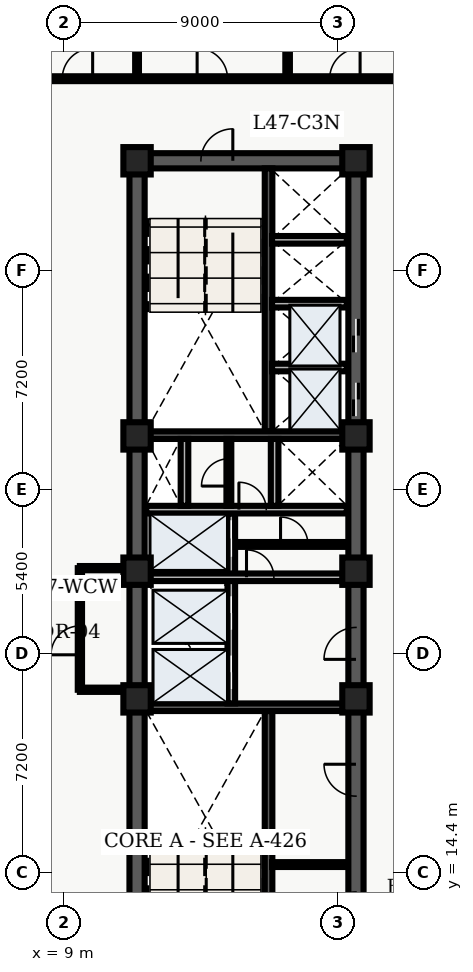
"""IFC4 building model, lengths in metres.
Left out: names, types, materials, properties, quantities, classifications, styles, units other than length and angle.
Written with IfcOpenShell. Run it as: python <this file> out.ifc"""

import sys

from ifc_helpers import new_model, entity, si_unit, converted_unit, direction, frame, origin_with_axes, origin_2d_with_axis, place, context, subcontext, project, spatial, polyline, rectangle, outline, extrude, element, fill, save


model = new_model("IFC4")
c1 = context("Model", 3, precision=1e-05, world=origin_with_axes(), true_north=direction((0.0, 1.0)))
c2 = subcontext(c1, "Body", "Model", "MODEL_VIEW")
j1 = project(units=[si_unit("LENGTHUNIT", "METRE"), converted_unit("PLANEANGLEUNIT", "DEGREE", entity("IfcPlaneAngleMeasure", 0.017), si_unit("PLANEANGLEUNIT", "RADIAN"), dimensions=[0, 0, 0, 0, 0, 0, 0])], contexts=[c1])
p1 = place(None, origin_with_axes())
s1 = spatial("IfcSite", under=j1, at=p1, CompositionType="ELEMENT")
p2 = place(p1, origin_with_axes())
s2 = spatial("IfcBuilding", under=s1, at=p2, CompositionType="ELEMENT")
p3 = place(p2, frame((0.0, 0.0, 192.6), z_axis=(0.0, 0.0, 1.0), x_axis=(1.0, 0.0, 0.0)))
s3 = spatial("IfcBuildingStorey", under=s2, at=p3, CompositionType="ELEMENT", Elevation=192.6)
p4 = place(p3, frame((11.4, 10.8, 0.0), z_axis=(0.0, 0.0, 1.0), x_axis=(0.0, 1.0, 0.0)))
e1 = element("IfcWall", 1, at=p4, inside=s3, PredefinedType="SHEAR", context=c2, shape_type="SweptSolid", body=[
    extrude(outline(polyline([(0.0, -0.25), (27.0, -0.25), (27.0, 0.25), (0.0, 0.25), (0.0, -0.25)])), origin_with_axes(), (0.0, 0.0, 1.0), 3.66),
])
p5 = place(p3, frame((11.4, 37.8, 0.0), z_axis=(0.0, 0.0, 1.0), x_axis=(1.0, 0.0, 0.0)))
e2 = element("IfcWall", 2, at=p5, inside=s3, PredefinedType="SHEAR", context=c2, shape_type="SweptSolid", body=[
    extrude(outline(polyline([(0.0, -0.25), (7.2, -0.25), (7.2, 0.25), (0.0, 0.25), (0.0, -0.25)])), origin_with_axes(), (0.0, 0.0, 1.0), 3.66),
])
p6 = place(p5, frame((2.625, 0.0, 0.0), z_axis=(0.0, 0.0, 1.0), x_axis=(1.0, 0.0, 0.0)))
e3 = element("IfcOpeningElement", 3, at=p6, cuts=e2, PredefinedType="OPENING", context=c2, shape_type="SweptSolid", body=[
    extrude(rectangle(XDim=1.05, YDim=0.52, at=origin_2d_with_axis()), origin_with_axes(), (0.0, 0.0, 1.0), 2.15),
])
p7 = place(p3, frame((18.6, 10.8, 0.0), z_axis=(0.0, 0.0, 1.0), x_axis=(0.0, 1.0, 0.0)))
e4 = element("IfcWall", 4, at=p7, inside=s3, PredefinedType="SHEAR", context=c2, shape_type="SweptSolid", body=[
    extrude(outline(polyline([(0.0, -0.25), (13.5, -0.25), (13.5, 0.25), (0.0, 0.25), (0.0, -0.25)])), origin_with_axes(), (0.0, 0.0, 1.0), 3.66),
])
p8 = place(p7, frame((11.125, 0.0, 0.0), z_axis=(0.0, 0.0, 1.0), x_axis=(1.0, 0.0, 0.0)))
e5 = element("IfcOpeningElement", 5, at=p8, cuts=e4, PredefinedType="OPENING", context=c2, shape_type="SweptSolid", body=[
    extrude(rectangle(XDim=1.05, YDim=0.52, at=origin_2d_with_axis()), origin_with_axes(), (0.0, 0.0, 1.0), 2.15),
])
p9 = place(p7, frame((2.425, 0.0, 0.0), z_axis=(0.0, 0.0, 1.0), x_axis=(1.0, 0.0, 0.0)))
e6 = element("IfcOpeningElement", 6, at=p9, cuts=e4, PredefinedType="OPENING", context=c2, shape_type="SweptSolid", body=[
    extrude(rectangle(XDim=1.05, YDim=0.52, at=origin_2d_with_axis()), origin_with_axes(), (0.0, 0.0, 1.0), 2.15),
])
p10 = place(p7, frame((6.625, 0.0, 0.0), z_axis=(0.0, 0.0, 1.0), x_axis=(1.0, 0.0, 0.0)))
e7 = element("IfcOpeningElement", 7, at=p10, cuts=e4, PredefinedType="OPENING", context=c2, shape_type="SweptSolid", body=[
    extrude(rectangle(XDim=1.05, YDim=0.52, at=origin_2d_with_axis()), origin_with_axes(), (0.0, 0.0, 1.0), 2.15),
])
p11 = place(p3, frame((18.6, 24.3, 0.0), z_axis=(0.0, 0.0, 1.0), x_axis=(0.0, 1.0, 0.0)))
e8 = element("IfcWall", 8, at=p11, inside=s3, PredefinedType="SHEAR", context=c2, shape_type="SweptSolid", body=[
    extrude(outline(polyline([(0.0, -0.25), (13.5, -0.25), (13.5, 0.25), (0.0, 0.25), (0.0, -0.25)])), origin_with_axes(), (0.0, 0.0, 1.0), 3.66),
])
p12 = place(p11, frame((5.65, 0.0, 0.0), z_axis=(0.0, 0.0, 1.0), x_axis=(1.0, 0.0, 0.0)))
e9 = element("IfcOpeningElement", 9, at=p12, cuts=e8, PredefinedType="OPENING", context=c2, shape_type="SweptSolid", body=[
    extrude(rectangle(XDim=1.1, YDim=0.52, at=origin_2d_with_axis()), origin_with_axes(), (0.0, 0.0, 1.0), 2.15),
])
p13 = place(p11, frame((7.75, 0.0, 0.0), z_axis=(0.0, 0.0, 1.0), x_axis=(1.0, 0.0, 0.0)))
e10 = element("IfcOpeningElement", 10, at=p13, cuts=e8, PredefinedType="OPENING", context=c2, shape_type="SweptSolid", body=[
    extrude(rectangle(XDim=1.1, YDim=0.52, at=origin_2d_with_axis()), origin_with_axes(), (0.0, 0.0, 1.0), 2.15),
])
p14 = place(p3, frame((15.725, 11.05, 0.0), z_axis=(0.0, 0.0, 1.0), x_axis=(0.0, 1.0, 0.0)))
e11 = element("IfcWall", 11, at=p14, inside=s3, PredefinedType="SHEAR", context=c2, shape_type="SweptSolid", body=[
    extrude(outline(polyline([(0.0, -0.125), (8.65, -0.125), (8.65, 0.125), (0.0, 0.125), (0.0, -0.125)])), origin_with_axes(), (0.0, 0.0, 1.0), 3.66),
])
p15 = place(p3, frame((11.65, 19.825, 0.0), z_axis=(0.0, 0.0, 1.0), x_axis=(1.0, 0.0, 0.0)))
e12 = element("IfcWall", 12, at=p15, inside=s3, PredefinedType="SHEAR", context=c2, shape_type="SweptSolid", body=[
    extrude(outline(polyline([(0.0, -0.125), (6.7, -0.125), (6.7, 0.125), (0.0, 0.125), (0.0, -0.125)])), origin_with_axes(), (0.0, 0.0, 1.0), 3.66),
])
p16 = place(p3, frame((15.725, 28.9, 0.0), z_axis=(0.0, 0.0, 1.0), x_axis=(0.0, 1.0, 0.0)))
e13 = element("IfcWall", 13, at=p16, inside=s3, PredefinedType="SHEAR", context=c2, shape_type="SweptSolid", body=[
    extrude(outline(polyline([(0.0, -0.125), (8.65, -0.125), (8.65, 0.125), (0.0, 0.125), (0.0, -0.125)])), origin_with_axes(), (0.0, 0.0, 1.0), 3.66),
])
p17 = place(p3, frame((11.65, 28.775, 0.0), z_axis=(0.0, 0.0, 1.0), x_axis=(1.0, 0.0, 0.0)))
e14 = element("IfcWall", 14, at=p17, inside=s3, PredefinedType="SHEAR", context=c2, shape_type="SweptSolid", body=[
    extrude(outline(polyline([(0.0, -0.125), (6.7, -0.125), (6.7, 0.125), (0.0, 0.125), (0.0, -0.125)])), origin_with_axes(), (0.0, 0.0, 1.0), 3.66),
])
p18 = place(p3, frame((14.5, 19.95, 0.0), z_axis=(0.0, 0.0, 1.0), x_axis=(0.0, 1.0, 0.0)))
e15 = element("IfcWall", 15, at=p18, inside=s3, PredefinedType="SOLIDWALL", context=c2, shape_type="SweptSolid", body=[
    extrude(outline(polyline([(0.0, -0.125), (6.25, -0.125), (6.25, 0.125), (0.0, 0.125), (0.0, -0.125)])), origin_with_axes(), (0.0, 0.0, 1.0), 2.7),
])
p19 = place(p18, frame((1.025, 0.0, 0.0), z_axis=(0.0, 0.0, 1.0), x_axis=(1.0, 0.0, 0.0)))
e16 = element("IfcOpeningElement", 16, at=p19, cuts=e15, PredefinedType="OPENING", context=c2, shape_type="SweptSolid", body=[
    extrude(rectangle(XDim=1.1, YDim=0.27, at=origin_2d_with_axis()), origin_with_axes(), (0.0, 0.0, 1.0), 2.15),
])
p20 = place(p18, frame((2.975, 0.0, 0.0), z_axis=(0.0, 0.0, 1.0), x_axis=(1.0, 0.0, 0.0)))
e17 = element("IfcOpeningElement", 17, at=p20, cuts=e15, PredefinedType="OPENING", context=c2, shape_type="SweptSolid", body=[
    extrude(rectangle(XDim=1.1, YDim=0.27, at=origin_2d_with_axis()), origin_with_axes(), (0.0, 0.0, 1.0), 2.15),
])
p21 = place(p18, frame((5.425, 0.0, 0.0), z_axis=(0.0, 0.0, 1.0), x_axis=(1.0, 0.0, 0.0)))
e18 = element("IfcOpeningElement", 18, at=p21, cuts=e15, PredefinedType="OPENING", context=c2, shape_type="SweptSolid", body=[
    extrude(rectangle(XDim=1.2, YDim=0.27, at=origin_2d_with_axis()), origin_with_axes(), (0.0, 0.0, 1.0), 2.15),
])
p22 = place(p3, frame((11.7, 24.1, 0.0), z_axis=(0.0, 0.0, 1.0), x_axis=(1.0, 0.0, 0.0)))
e19 = element("IfcWall", 19, at=p22, inside=s3, PredefinedType="SOLIDWALL", context=c2, shape_type="SweptSolid", body=[
    extrude(outline(polyline([(0.0, -0.125), (6.6, -0.125), (6.6, 0.125), (0.0, 0.125), (0.0, -0.125)])), origin_with_axes(), (0.0, 0.0, 1.0), 2.7),
])
p23 = place(p22, frame((3.75, 0.0, 0.0), z_axis=(0.0, 0.0, 1.0), x_axis=(1.0, 0.0, 0.0)))
e20 = element("IfcOpeningElement", 20, at=p23, cuts=e19, PredefinedType="OPENING", context=c2, shape_type="SweptSolid", body=[
    extrude(rectangle(XDim=0.9, YDim=0.27, at=origin_2d_with_axis()), origin_with_axes(), (0.0, 0.0, 1.0), 2.15),
])
p24 = place(p3, frame((11.7, 26.325, 0.0), z_axis=(0.0, 0.0, 1.0), x_axis=(1.0, 0.0, 0.0)))
e21 = element("IfcWall", 21, at=p24, inside=s3, PredefinedType="SOLIDWALL", context=c2, shape_type="SweptSolid", body=[
    extrude(outline(polyline([(0.0, -0.125), (6.6, -0.125), (6.6, 0.125), (0.0, 0.125), (0.0, -0.125)])), origin_with_axes(), (0.0, 0.0, 1.0), 2.7),
])
p25 = place(p24, frame((3.5, 0.0, 0.0), z_axis=(0.0, 0.0, 1.0), x_axis=(1.0, 0.0, 0.0)))
e22 = element("IfcOpeningElement", 22, at=p25, cuts=e21, PredefinedType="OPENING", context=c2, shape_type="SweptSolid", body=[
    extrude(rectangle(XDim=0.9, YDim=0.27, at=origin_2d_with_axis()), origin_with_axes(), (0.0, 0.0, 1.0), 2.15),
])
for number, where, z_axis, x_axis in (
    (23, (12.96, 26.45, 0.0), (0.0, 0.0, 1.0), (0.0, 1.0, 0.0)),
    (24, (15.925, 26.45, 0.0), (0.0, 0.0, 1.0), (0.0, 1.0, 0.0)),
):
    element("IfcWall", number, at=place(p3, frame(where, z_axis=z_axis, x_axis=x_axis)), inside=s3, PredefinedType="SOLIDWALL", context=c2, shape_type="SweptSolid", body=[
        extrude(outline(polyline([(0.0, -0.125), (2.2, -0.125), (2.2, 0.125), (0.0, 0.125), (0.0, -0.125)])), origin_with_axes(), (0.0, 0.0, 1.0), 2.7),
    ])
for number, where, z_axis, x_axis in (
    (25, (11.4, 20.1, 0.0), (0.0, 0.0, 1.0), (1.0, 0.0, 0.0)),
    (26, (11.4, 24.3, 0.0), (0.0, 0.0, 1.0), (1.0, 0.0, 0.0)),
    (27, (11.4, 28.75, 0.0), (0.0, 0.0, 1.0), (1.0, 0.0, 0.0)),
    (28, (11.4, 37.8, 0.0), (0.0, 0.0, 1.0), (1.0, 0.0, 0.0)),
    (29, (18.6, 20.1, 0.0), (0.0, 0.0, 1.0), (1.0, 0.0, 0.0)),
    (30, (18.6, 24.3, 0.0), (0.0, 0.0, 1.0), (1.0, 0.0, 0.0)),
    (31, (18.6, 28.75, 0.0), (0.0, 0.0, 1.0), (1.0, 0.0, 0.0)),
    (32, (18.6, 37.8, 0.0), (0.0, 0.0, 1.0), (1.0, 0.0, 0.0)),
):
    element("IfcColumn", number, at=place(p3, frame(where, z_axis=z_axis, x_axis=x_axis)), inside=s3, PredefinedType="COLUMN", context=c2, shape_type="SweptSolid", body=[
        extrude(rectangle(XDim=0.9, YDim=0.9, at=origin_2d_with_axis()), origin_with_axes(), (0.0, 0.0, 1.0), 3.9),
    ])
p26 = place(p3, frame((14.62, 25.18, 0.0), z_axis=(0.0, 0.0, 1.0), x_axis=(1.0, 0.0, 0.0)))
e33 = element("IfcWall", 33, at=p26, inside=s3, PredefinedType="PARTITIONING", context=c2, shape_type="SweptSolid", body=[
    extrude(outline(polyline([(0.0, -0.08), (3.68, -0.08), (3.68, 0.08), (0.0, 0.08), (0.0, -0.08)])), origin_with_axes(), (0.0, 0.0, 1.0), 2.7),
])
p27 = place(p26, frame((1.95, 0.0, 0.0), z_axis=(0.0, 0.0, 1.0), x_axis=(1.0, 0.0, 0.0)))
e34 = element("IfcOpeningElement", 34, at=p27, cuts=e33, PredefinedType="OPENING", context=c2, shape_type="SweptSolid", body=[
    extrude(rectangle(XDim=0.9, YDim=0.18, at=origin_2d_with_axis()), origin_with_axes(), (0.0, 0.0, 1.0), 2.15),
])
p28 = place(p3, frame((14.42, 26.45, 0.0), z_axis=(0.0, 0.0, 1.0), x_axis=(0.0, 1.0, 0.0)))
e35 = element("IfcWall", 35, at=p28, inside=s3, PredefinedType="PARTITIONING", context=c2, shape_type="SweptSolid", body=[
    extrude(outline(polyline([(0.0, -0.08), (2.2, -0.08), (2.2, 0.08), (0.0, 0.08), (0.0, -0.08)])), origin_with_axes(), (0.0, 0.0, 1.0), 2.7),
])
p29 = place(p28, frame((1.1, 0.0, 0.0), z_axis=(0.0, 0.0, 1.0), x_axis=(1.0, 0.0, 0.0)))
e36 = element("IfcOpeningElement", 36, at=p29, cuts=e35, PredefinedType="OPENING", context=c2, shape_type="SweptSolid", body=[
    extrude(rectangle(XDim=0.9, YDim=0.18, at=origin_2d_with_axis()), origin_with_axes(), (0.0, 0.0, 1.0), 2.15),
])
p30 = place(p3, frame((15.84, 14.65, 0.0), z_axis=(0.0, 0.0, 1.0), x_axis=(1.0, 0.0, 0.0)))
e37 = element("IfcWall", 37, at=p30, inside=s3, PredefinedType="PARTITIONING", context=c2, shape_type="SweptSolid", body=[
    extrude(outline(polyline([(0.0, -0.08), (2.46, -0.08), (2.46, 0.08), (0.0, 0.08), (0.0, -0.08)])), origin_with_axes(), (0.0, 0.0, 1.0), 2.7),
])
for number, where, z_axis, x_axis in (
    (38, (15.84, 31.0, 0.0), (0.0, 0.0, 1.0), (1.0, 0.0, 0.0)),
    (39, (15.84, 33.1, 0.0), (0.0, 0.0, 1.0), (1.0, 0.0, 0.0)),
    (40, (15.84, 35.2, 0.0), (0.0, 0.0, 1.0), (1.0, 0.0, 0.0)),
):
    element("IfcWall", number, at=place(p3, frame(where, z_axis=z_axis, x_axis=x_axis)), inside=s3, PredefinedType="SOLIDWALL", context=c2, shape_type="SweptSolid", body=[
        extrude(outline(polyline([(0.0, -0.125), (2.46, -0.125), (2.46, 0.125), (0.0, 0.125), (0.0, -0.125)])), origin_with_axes(), (0.0, 0.0, 1.0), 2.7),
    ])
p31 = place(p3, frame((9.52, 20.4, 0.0), z_axis=(0.0, 0.0, 1.0), x_axis=(0.0, 1.0, 0.0)))
e41 = element("IfcWall", 41, at=p31, inside=s3, PredefinedType="PARTITIONING", context=c2, shape_type="SweptSolid", body=[
    extrude(outline(polyline([(0.0, -0.07), (4.0, -0.07), (4.0, 0.07), (0.0, 0.07), (0.0, -0.07)])), origin_with_axes(), (0.0, 0.0, 1.0), 2.7),
])
p32 = place(p31, frame((1.625, 0.0, 0.0), z_axis=(0.0, 0.0, 1.0), x_axis=(1.0, 0.0, 0.0)))
e42 = element("IfcOpeningElement", 42, at=p32, cuts=e41, PredefinedType="OPENING", context=c2, shape_type="SweptSolid", body=[
    extrude(rectangle(XDim=0.95, YDim=0.16, at=origin_2d_with_axis()), origin_with_axes(), (0.0, 0.0, 1.0), 2.15),
])
for number, where, z_axis, x_axis in (
    (43, (9.52, 20.4, 0.0), (0.0, 0.0, 1.0), (1.0, 0.0, 0.0)),
    (44, (9.52, 24.4, 0.0), (0.0, 0.0, 1.0), (1.0, 0.0, 0.0)),
):
    element("IfcWall", number, at=place(p3, frame(where, z_axis=z_axis, x_axis=x_axis)), inside=s3, PredefinedType="PARTITIONING", context=c2, shape_type="SweptSolid", body=[
        extrude(outline(polyline([(0.0, -0.07), (1.58, -0.07), (1.58, 0.07), (0.0, 0.07), (0.0, -0.07)])), origin_with_axes(), (0.0, 0.0, 1.0), 2.7),
    ])
p33 = place(p3, frame((2.6, 40.5, 0.0), z_axis=(0.0, 0.0, 1.0), x_axis=(1.0, 0.0, 0.0)))
e45 = element("IfcWall", 45, at=p33, inside=s3, PredefinedType="PARTITIONING", context=c2, shape_type="SweptSolid", body=[
    extrude(outline(polyline([(0.0, -0.08), (24.746, -0.08), (24.746, 0.08), (0.0, 0.08), (0.0, -0.08)])), origin_with_axes(), (0.0, 0.0, 1.0), 2.7),
])
p34 = place(p33, frame((1.554, 0.0, 0.0), z_axis=(0.0, 0.0, 1.0), x_axis=(1.0, 0.0, 0.0)))
e46 = element("IfcOpeningElement", 46, at=p34, cuts=e45, PredefinedType="OPENING", context=c2, shape_type="SweptSolid", body=[
    extrude(rectangle(XDim=1.0, YDim=0.18, at=origin_2d_with_axis()), origin_with_axes(), (0.0, 0.0, 1.0), 2.15),
])
p35 = place(p33, frame((6.84, 0.0, 0.0), z_axis=(0.0, 0.0, 1.0), x_axis=(1.0, 0.0, 0.0)))
e47 = element("IfcOpeningElement", 47, at=p35, cuts=e45, PredefinedType="OPENING", context=c2, shape_type="SweptSolid", body=[
    extrude(rectangle(XDim=1.0, YDim=0.18, at=origin_2d_with_axis()), origin_with_axes(), (0.0, 0.0, 1.0), 2.15),
])
p36 = place(p33, frame((11.276, 0.0, 0.0), z_axis=(0.0, 0.0, 1.0), x_axis=(1.0, 0.0, 0.0)))
e48 = element("IfcOpeningElement", 48, at=p36, cuts=e45, PredefinedType="OPENING", context=c2, shape_type="SweptSolid", body=[
    extrude(rectangle(XDim=1.0, YDim=0.18, at=origin_2d_with_axis()), origin_with_axes(), (0.0, 0.0, 1.0), 2.15),
])
p37 = place(p33, frame((15.636, 0.0, 0.0), z_axis=(0.0, 0.0, 1.0), x_axis=(1.0, 0.0, 0.0)))
e49 = element("IfcOpeningElement", 49, at=p37, cuts=e45, PredefinedType="OPENING", context=c2, shape_type="SweptSolid", body=[
    extrude(rectangle(XDim=1.0, YDim=0.18, at=origin_2d_with_axis()), origin_with_axes(), (0.0, 0.0, 1.0), 2.15),
])
p38 = place(p3, frame((11.4, 40.6, 0.0), z_axis=(0.0, 0.0, 1.0), x_axis=(0.0, 1.0, 0.0)))
e50 = element("IfcWall", 50, at=p38, inside=s3, PredefinedType="PARTITIONING", context=c2, shape_type="SweptSolid", body=[
    extrude(outline(polyline([(0.0, -0.062), (7.665, -0.062), (7.665, 0.062), (0.0, 0.062), (0.0, -0.062)])), origin_with_axes(), (0.0, 0.0, 1.0), 2.7),
])
p39 = place(p3, frame((16.352, 40.6, 0.0), z_axis=(0.0, 0.0, 1.0), x_axis=(0.0, 1.0, 0.0)))
e51 = element("IfcWall", 51, at=p39, inside=s3, PredefinedType="PARTITIONING", context=c2, shape_type="SweptSolid", body=[
    extrude(outline(polyline([(0.0, -0.075), (7.665, -0.075), (7.665, 0.075), (0.0, 0.075), (0.0, -0.075)])), origin_with_axes(), (0.0, 0.0, 1.0), 2.7),
])
p40 = place(p11, frame((5.65, 0.0, 0.0), z_axis=(0.0, 0.0, 1.0), x_axis=(1.0, 0.0, 0.0)))
e52 = element("IfcDoor", 52, at=p40, inside=s3, OperationType="SLIDING_TO_LEFT", PredefinedType="DOOR", context=c2, shape_type="SweptSolid", body=[
    extrude(rectangle(XDim=1.1, YDim=0.09, at=origin_2d_with_axis()), origin_with_axes(), (0.0, 0.0, 1.0), 2.15),
])
fill(e9, e52)
p41 = place(p11, frame((7.75, 0.0, 0.0), z_axis=(0.0, 0.0, 1.0), x_axis=(1.0, 0.0, 0.0)))
e53 = element("IfcDoor", 53, at=p41, inside=s3, OperationType="SLIDING_TO_RIGHT", PredefinedType="DOOR", context=c2, shape_type="SweptSolid", body=[
    extrude(rectangle(XDim=1.1, YDim=0.09, at=origin_2d_with_axis()), origin_with_axes(), (0.0, 0.0, 1.0), 2.15),
])
fill(e10, e53)
p42 = place(p18, frame((1.025, 0.0, 0.0), z_axis=(0.0, 0.0, 1.0), x_axis=(1.0, 0.0, 0.0)))
e54 = element("IfcDoor", 54, at=p42, inside=s3, OperationType="SLIDING_TO_LEFT", PredefinedType="DOOR", context=c2, shape_type="SweptSolid", body=[
    extrude(rectangle(XDim=1.1, YDim=0.09, at=origin_2d_with_axis()), origin_with_axes(), (0.0, 0.0, 1.0), 2.15),
])
fill(e16, e54)
p43 = place(p18, frame((2.975, 0.0, 0.0), z_axis=(0.0, 0.0, 1.0), x_axis=(1.0, 0.0, 0.0)))
e55 = element("IfcDoor", 55, at=p43, inside=s3, OperationType="SLIDING_TO_RIGHT", PredefinedType="DOOR", context=c2, shape_type="SweptSolid", body=[
    extrude(rectangle(XDim=1.1, YDim=0.09, at=origin_2d_with_axis()), origin_with_axes(), (0.0, 0.0, 1.0), 2.15),
])
fill(e17, e55)
p44 = place(p18, frame((5.425, 0.0, 0.0), z_axis=(0.0, 0.0, 1.0), x_axis=(1.0, 0.0, 0.0)))
e56 = element("IfcDoor", 56, at=p44, inside=s3, OperationType="DOUBLE_DOOR_SLIDING", PredefinedType="DOOR", context=c2, shape_type="SweptSolid", body=[
    extrude(rectangle(XDim=1.2, YDim=0.09, at=origin_2d_with_axis()), origin_with_axes(), (0.0, 0.0, 1.0), 2.15),
])
fill(e18, e56)
p45 = place(p5, frame((2.625, 0.0, 0.0), z_axis=(0.0, 0.0, 1.0), x_axis=(1.0, 0.0, 0.0)))
e57 = element("IfcDoor", 57, at=p45, inside=s3, OperationType="SINGLE_SWING_RIGHT", PredefinedType="DOOR", context=c2, shape_type="SweptSolid", body=[
    extrude(rectangle(XDim=1.05, YDim=0.09, at=origin_2d_with_axis()), origin_with_axes(), (0.0, 0.0, 1.0), 2.15),
])
fill(e3, e57)
p46 = place(p7, frame((11.125, 0.0, 0.0), z_axis=(0.0, 0.0, 1.0), x_axis=(1.0, 0.0, 0.0)))
e58 = element("IfcDoor", 58, at=p46, inside=s3, OperationType="SINGLE_SWING_LEFT", PredefinedType="DOOR", context=c2, shape_type="SweptSolid", body=[
    extrude(rectangle(XDim=1.05, YDim=0.09, at=origin_2d_with_axis()), origin_with_axes(), (0.0, 0.0, 1.0), 2.15),
])
fill(e5, e58)
p47 = place(p24, frame((3.5, 0.0, 0.0), z_axis=(0.0, 0.0, 1.0), x_axis=(1.0, 0.0, 0.0)))
e59 = element("IfcDoor", 59, at=p47, inside=s3, OperationType="SINGLE_SWING_LEFT", PredefinedType="DOOR", context=c2, shape_type="SweptSolid", body=[
    extrude(rectangle(XDim=0.9, YDim=0.09, at=origin_2d_with_axis()), origin_with_axes(), (0.0, 0.0, 1.0), 2.15),
])
fill(e22, e59)
p48 = place(p28, frame((1.1, 0.0, 0.0), z_axis=(0.0, 0.0, 1.0), x_axis=(1.0, 0.0, 0.0)))
e60 = element("IfcDoor", 60, at=p48, inside=s3, OperationType="SINGLE_SWING_LEFT", PredefinedType="DOOR", context=c2, shape_type="SweptSolid", body=[
    extrude(rectangle(XDim=0.9, YDim=0.09, at=origin_2d_with_axis()), origin_with_axes(), (0.0, 0.0, 1.0), 2.15),
])
fill(e36, e60)
p49 = place(p22, frame((3.75, 0.0, 0.0), z_axis=(0.0, 0.0, 1.0), x_axis=(1.0, 0.0, 0.0)))
e61 = element("IfcDoor", 61, at=p49, inside=s3, OperationType="SINGLE_SWING_LEFT", PredefinedType="DOOR", context=c2, shape_type="SweptSolid", body=[
    extrude(rectangle(XDim=0.9, YDim=0.09, at=origin_2d_with_axis()), origin_with_axes(), (0.0, 0.0, 1.0), 2.15),
])
fill(e20, e61)
p50 = place(p26, frame((1.95, 0.0, 0.0), z_axis=(0.0, 0.0, 1.0), x_axis=(1.0, 0.0, 0.0)))
e62 = element("IfcDoor", 62, at=p50, inside=s3, OperationType="SINGLE_SWING_LEFT", PredefinedType="DOOR", context=c2, shape_type="SweptSolid", body=[
    extrude(rectangle(XDim=0.9, YDim=0.09, at=origin_2d_with_axis()), origin_with_axes(), (0.0, 0.0, 1.0), 2.15),
])
fill(e34, e62)
p51 = place(p7, frame((2.425, 0.0, 0.0), z_axis=(0.0, 0.0, 1.0), x_axis=(1.0, 0.0, 0.0)))
e63 = element("IfcDoor", 63, at=p51, inside=s3, OperationType="SINGLE_SWING_LEFT", PredefinedType="DOOR", context=c2, shape_type="SweptSolid", body=[
    extrude(rectangle(XDim=1.05, YDim=0.09, at=origin_2d_with_axis()), origin_with_axes(), (0.0, 0.0, 1.0), 2.15),
])
fill(e6, e63)
p52 = place(p7, frame((6.625, 0.0, 0.0), z_axis=(0.0, 0.0, 1.0), x_axis=(1.0, 0.0, 0.0)))
e64 = element("IfcDoor", 64, at=p52, inside=s3, OperationType="SINGLE_SWING_RIGHT", PredefinedType="DOOR", context=c2, shape_type="SweptSolid", body=[
    extrude(rectangle(XDim=1.05, YDim=0.09, at=origin_2d_with_axis()), origin_with_axes(), (0.0, 0.0, 1.0), 2.15),
])
fill(e7, e64)
p53 = place(p31, frame((1.625, 0.0, 0.0), z_axis=(0.0, 0.0, 1.0), x_axis=(1.0, 0.0, 0.0)))
e65 = element("IfcDoor", 65, at=p53, inside=s3, OperationType="SINGLE_SWING_LEFT", PredefinedType="DOOR", context=c2, shape_type="SweptSolid", body=[
    extrude(rectangle(XDim=0.95, YDim=0.084, at=origin_2d_with_axis()), origin_with_axes(), (0.0, 0.0, 1.0), 2.15),
])
fill(e42, e65)
p54 = place(p33, frame((6.84, 0.0, 0.0), z_axis=(0.0, 0.0, 1.0), x_axis=(1.0, 0.0, 0.0)))
e66 = element("IfcDoor", 66, at=p54, inside=s3, OperationType="SINGLE_SWING_RIGHT", PredefinedType="DOOR", context=c2, shape_type="SweptSolid", body=[
    extrude(rectangle(XDim=1.0, YDim=0.09, at=origin_2d_with_axis()), origin_with_axes(), (0.0, 0.0, 1.0), 2.15),
])
fill(e47, e66)
p55 = place(p33, frame((11.276, 0.0, 0.0), z_axis=(0.0, 0.0, 1.0), x_axis=(1.0, 0.0, 0.0)))
e67 = element("IfcDoor", 67, at=p55, inside=s3, OperationType="SINGLE_SWING_LEFT", PredefinedType="DOOR", context=c2, shape_type="SweptSolid", body=[
    extrude(rectangle(XDim=1.0, YDim=0.09, at=origin_2d_with_axis()), origin_with_axes(), (0.0, 0.0, 1.0), 2.15),
])
fill(e48, e67)
p56 = place(p33, frame((15.636, 0.0, 0.0), z_axis=(0.0, 0.0, 1.0), x_axis=(1.0, 0.0, 0.0)))
e68 = element("IfcDoor", 68, at=p56, inside=s3, OperationType="SINGLE_SWING_RIGHT", PredefinedType="DOOR", context=c2, shape_type="SweptSolid", body=[
    extrude(rectangle(XDim=1.0, YDim=0.09, at=origin_2d_with_axis()), origin_with_axes(), (0.0, 0.0, 1.0), 2.15),
])
fill(e49, e68)
save(model, sys.argv[1])
